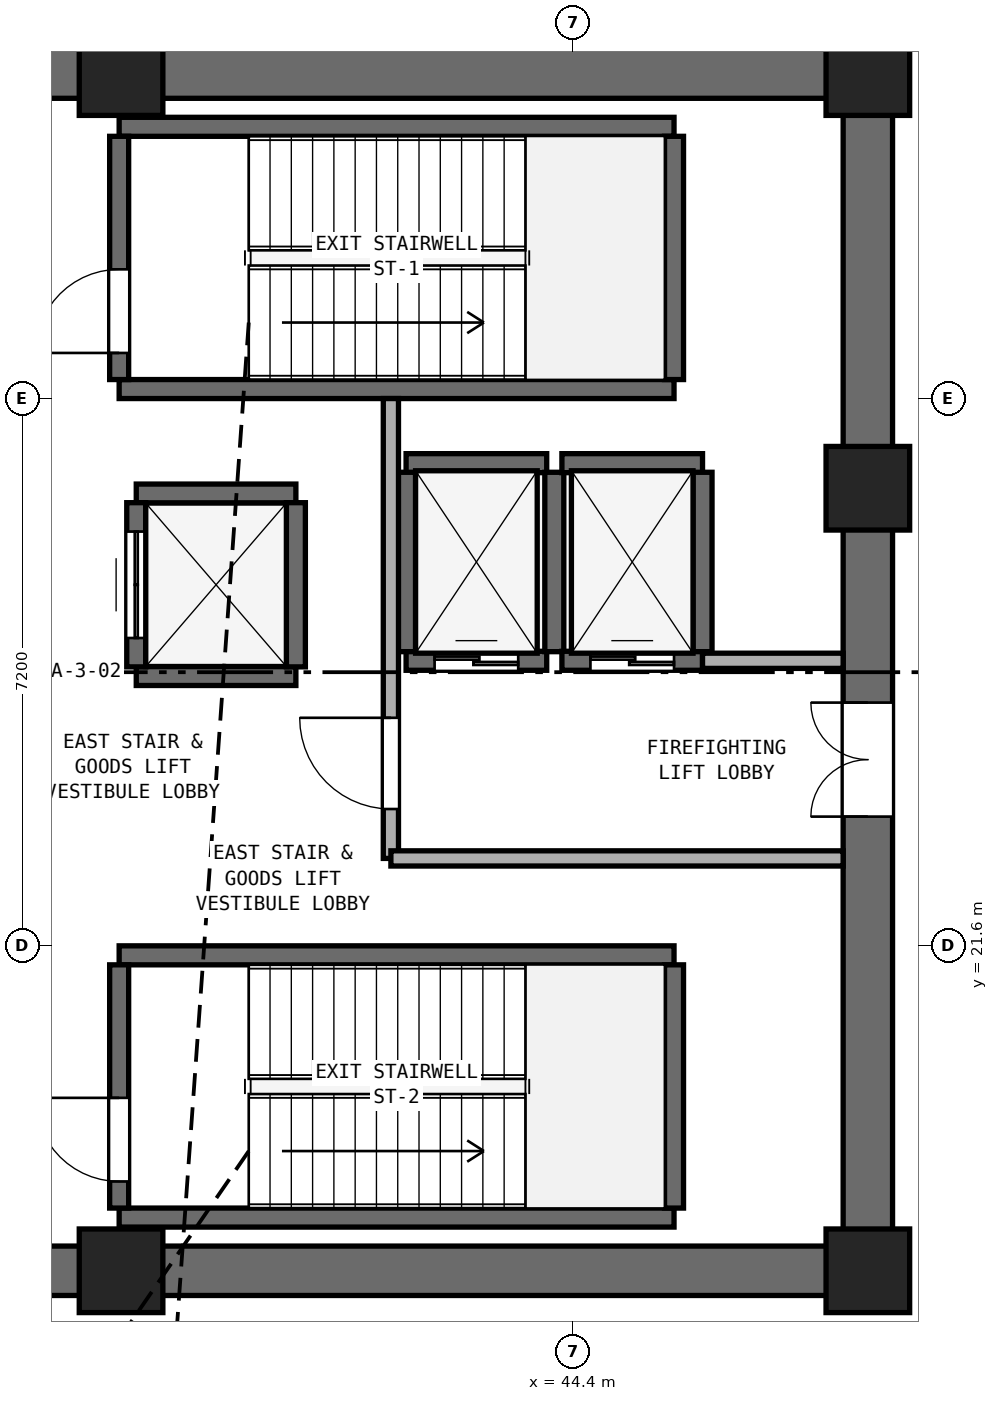
"""IFC4 building model, lengths in metres.
Left out: names, types, materials, properties, quantities, classifications, styles, units other than length and angle.
Written with IfcOpenShell. Run it as: python <this file> out.ifc"""

import sys

from ifc_helpers import new_model, si_unit, direction, frame, frame_2d, origin, origin_2d, place, context, subcontext, project, spatial, rectangle, extrude, element, fill, save


model = new_model("IFC4")
c1 = context("Model", 3, precision=1e-05, world=origin(), true_north=direction((0.0, 1.0)))
c2 = subcontext(c1, "Body", "Model", "MODEL_VIEW")
j1 = project(units=[si_unit("LENGTHUNIT", "METRE"), si_unit("PLANEANGLEUNIT", "RADIAN")], contexts=[c1])
p1 = place(None, origin())
s1 = spatial("IfcSite", under=j1, at=p1, CompositionType="ELEMENT")
p2 = place(p1, origin())
s2 = spatial("IfcBuilding", under=s1, at=p2, CompositionType="ELEMENT")
p3 = place(p2, origin())
s3 = spatial("IfcBuildingStorey", under=s2, at=p3, CompositionType="ELEMENT", Elevation=0.0)
for number, where, z_axis, x_axis in (
    (1, (25.4, 17.325, 0.0), (0.0, 0.0, 1.0), (1.0, 0.0, 0.0)),
    (2, (25.4, 33.075, 0.0), (0.0, 0.0, 1.0), (1.0, 0.0, 0.0)),
):
    element("IfcWall", number, at=place(p3, frame(where, z_axis=z_axis, x_axis=x_axis)), inside=s3, PredefinedType="SHEAR", context=c2, shape_type="SweptSolid", body=[
        extrude(rectangle(XDim=23.2, YDim=0.65, at=frame_2d((11.6, 0.0))), origin(), (0.0, 0.0, 1.0), 4.66),
    ])
p4 = place(p3, frame((48.275, 17.65, 0.0), z_axis=(0.0, 0.0, 1.0), x_axis=(0.0, 1.0, 0.0)))
e3 = element("IfcWall", 3, at=p4, inside=s3, PredefinedType="SHEAR", context=c2, shape_type="SweptSolid", body=[
    extrude(rectangle(XDim=15.1, YDim=0.65, at=frame_2d((7.55, 0.0))), origin(), (0.0, 0.0, 1.0), 4.66),
])
p5 = place(p4, frame((5.65, 0.0, 0.0)))
e4 = element("IfcOpeningElement", 4, at=p5, cuts=e3, PredefinedType="OPENING", context=c2, shape_type="SweptSolid", body=[
    extrude(rectangle(XDim=1.5, YDim=2.15, at=frame_2d((0.75, 1.075))), frame((0.0, 0.335, 0.0), z_axis=(0.0, -1.0, 0.0), x_axis=(1.0, 0.0, 0.0)), (0.0, 0.0, 1.0), 0.67),
])
for number, where, z_axis, x_axis in (
    (5, (38.45, 17.325, 0.0), (0.0, 0.0, 1.0), (1.0, 0.0, 0.0)),
    (6, (48.275, 17.325, 0.0), (0.0, 0.0, 1.0), (1.0, 0.0, 0.0)),
    (7, (48.275, 27.62, 0.0), (0.0, 0.0, 1.0), (1.0, 0.0, 0.0)),
    (8, (48.275, 33.075, 0.0), (0.0, 0.0, 1.0), (1.0, 0.0, 0.0)),
    (9, (38.45, 33.075, 0.0), (0.0, 0.0, 1.0), (1.0, 0.0, 0.0)),
):
    element("IfcColumn", number, at=place(p3, frame(where, z_axis=z_axis, x_axis=x_axis)), inside=s3, PredefinedType="PILASTER", context=c2, shape_type="SweptSolid", body=[
        extrude(rectangle(XDim=1.1, YDim=1.1, at=origin_2d()), origin(), (0.0, 0.0, 1.0), 5.0),
    ])
for number, where, z_axis, x_axis in (
    (10, (38.425, 28.925, 0.0), (0.0, 0.0, 1.0), (1.0, 0.0, 0.0)),
    (11, (38.425, 32.375, 0.0), (0.0, 0.0, 1.0), (1.0, 0.0, 0.0)),
):
    element("IfcWall", number, at=place(p3, frame(where, z_axis=z_axis, x_axis=x_axis)), inside=s3, PredefinedType="SHEAR", context=c2, shape_type="SweptSolid", body=[
        extrude(rectangle(XDim=7.3, YDim=0.25, at=frame_2d((3.65, 0.0))), origin(), (0.0, 0.0, 1.0), 4.66),
    ])
p6 = place(p3, frame((38.425, 29.05, 0.0), z_axis=(0.0, 0.0, 1.0), x_axis=(0.0, 1.0, 0.0)))
e12 = element("IfcWall", 12, at=p6, inside=s3, PredefinedType="SHEAR", context=c2, shape_type="SweptSolid", body=[
    extrude(rectangle(XDim=3.2, YDim=0.25, at=frame_2d((1.6, 0.0))), origin(), (0.0, 0.0, 1.0), 4.66),
])
p7 = place(p6, frame((0.35, 0.0, 0.0)))
e13 = element("IfcOpeningElement", 13, at=p7, cuts=e12, PredefinedType="OPENING", context=c2, shape_type="SweptSolid", body=[
    extrude(rectangle(XDim=1.1, YDim=2.15, at=frame_2d((0.55, 1.075))), frame((0.0, 0.135, 0.0), z_axis=(0.0, -1.0, 0.0), x_axis=(1.0, 0.0, 0.0)), (0.0, 0.0, 1.0), 0.27),
])
p8 = place(p3, frame((45.725, 29.05, 0.0), z_axis=(0.0, 0.0, 1.0), x_axis=(0.0, 1.0, 0.0)))
e14 = element("IfcWall", 14, at=p8, inside=s3, PredefinedType="SHEAR", context=c2, shape_type="SweptSolid", body=[
    extrude(rectangle(XDim=3.2, YDim=0.25, at=frame_2d((1.6, 0.0))), origin(), (0.0, 0.0, 1.0), 4.66),
])
for number, where, z_axis, x_axis in (
    (15, (38.425, 18.025, 0.0), (0.0, 0.0, 1.0), (1.0, 0.0, 0.0)),
    (16, (38.425, 21.475, 0.0), (0.0, 0.0, 1.0), (1.0, 0.0, 0.0)),
):
    element("IfcWall", number, at=place(p3, frame(where, z_axis=z_axis, x_axis=x_axis)), inside=s3, PredefinedType="SHEAR", context=c2, shape_type="SweptSolid", body=[
        extrude(rectangle(XDim=7.3, YDim=0.25, at=frame_2d((3.65, 0.0))), origin(), (0.0, 0.0, 1.0), 4.66),
    ])
p9 = place(p3, frame((38.425, 18.15, 0.0), z_axis=(0.0, 0.0, 1.0), x_axis=(0.0, 1.0, 0.0)))
e17 = element("IfcWall", 17, at=p9, inside=s3, PredefinedType="SHEAR", context=c2, shape_type="SweptSolid", body=[
    extrude(rectangle(XDim=3.2, YDim=0.25, at=frame_2d((1.6, 0.0))), origin(), (0.0, 0.0, 1.0), 4.66),
])
p10 = place(p9, frame((0.35, 0.0, 0.0)))
e18 = element("IfcOpeningElement", 18, at=p10, cuts=e17, PredefinedType="OPENING", context=c2, shape_type="SweptSolid", body=[
    extrude(rectangle(XDim=1.1, YDim=2.15, at=frame_2d((0.55, 1.075))), frame((0.0, 0.135, 0.0), z_axis=(0.0, -1.0, 0.0), x_axis=(1.0, 0.0, 0.0)), (0.0, 0.0, 1.0), 0.27),
])
p11 = place(p3, frame((45.725, 18.15, 0.0), z_axis=(0.0, 0.0, 1.0), x_axis=(0.0, 1.0, 0.0)))
e19 = element("IfcWall", 19, at=p11, inside=s3, PredefinedType="SHEAR", context=c2, shape_type="SweptSolid", body=[
    extrude(rectangle(XDim=3.2, YDim=0.25, at=frame_2d((1.6, 0.0))), origin(), (0.0, 0.0, 1.0), 4.66),
])
p12 = place(p3, frame((42.2, 25.35, 0.0), z_axis=(0.0, 0.0, 1.0), x_axis=(1.0, 0.0, 0.0)))
e20 = element("IfcWall", 20, at=p12, inside=s3, PredefinedType="SHEAR", context=c2, shape_type="SweptSolid", body=[
    extrude(rectangle(XDim=1.85, YDim=0.25, at=frame_2d((0.925, 0.0))), origin(), (0.0, 0.0, 1.0), 4.66),
])
p13 = place(p12, frame((0.375, 0.0, 0.0)))
e21 = element("IfcOpeningElement", 21, at=p13, cuts=e20, PredefinedType="OPENING", context=c2, shape_type="SweptSolid", body=[
    extrude(rectangle(XDim=1.1, YDim=2.15, at=frame_2d((0.55, 1.075))), frame((0.0, 0.135, 0.0), z_axis=(0.0, -1.0, 0.0), x_axis=(1.0, 0.0, 0.0)), (0.0, 0.0, 1.0), 0.27),
])
p14 = place(p3, frame((42.2, 27.95, 0.0), z_axis=(0.0, 0.0, 1.0), x_axis=(1.0, 0.0, 0.0)))
e22 = element("IfcWall", 22, at=p14, inside=s3, PredefinedType="SHEAR", context=c2, shape_type="SweptSolid", body=[
    extrude(rectangle(XDim=1.85, YDim=0.25, at=frame_2d((0.925, 0.0))), origin(), (0.0, 0.0, 1.0), 4.66),
])
for number, where, z_axis, x_axis in (
    (23, (42.2, 25.47, 0.0), (0.0, 0.0, 1.0), (0.0, 1.0, 0.0)),
    (24, (44.15, 25.47, 0.0), (0.0, 0.0, 1.0), (0.0, 1.0, 0.0)),
):
    element("IfcWall", number, at=place(p3, frame(where, z_axis=z_axis, x_axis=x_axis)), inside=s3, PredefinedType="SHEAR", context=c2, shape_type="SweptSolid", body=[
        extrude(rectangle(XDim=2.36, YDim=0.25, at=frame_2d((1.18, 0.0))), origin(), (0.0, 0.0, 1.0), 4.66),
    ])
p15 = place(p3, frame((44.25, 25.35, 0.0), z_axis=(0.0, 0.0, 1.0), x_axis=(1.0, 0.0, 0.0)))
e25 = element("IfcWall", 25, at=p15, inside=s3, PredefinedType="SHEAR", context=c2, shape_type="SweptSolid", body=[
    extrude(rectangle(XDim=1.85, YDim=0.25, at=frame_2d((0.925, 0.0))), origin(), (0.0, 0.0, 1.0), 4.66),
])
p16 = place(p15, frame((0.375, 0.0, 0.0)))
e26 = element("IfcOpeningElement", 26, at=p16, cuts=e25, PredefinedType="OPENING", context=c2, shape_type="SweptSolid", body=[
    extrude(rectangle(XDim=1.1, YDim=2.15, at=frame_2d((0.55, 1.075))), frame((0.0, 0.135, 0.0), z_axis=(0.0, -1.0, 0.0), x_axis=(1.0, 0.0, 0.0)), (0.0, 0.0, 1.0), 0.27),
])
p17 = place(p3, frame((44.25, 27.95, 0.0), z_axis=(0.0, 0.0, 1.0), x_axis=(1.0, 0.0, 0.0)))
e27 = element("IfcWall", 27, at=p17, inside=s3, PredefinedType="SHEAR", context=c2, shape_type="SweptSolid", body=[
    extrude(rectangle(XDim=1.85, YDim=0.25, at=frame_2d((0.925, 0.0))), origin(), (0.0, 0.0, 1.0), 4.66),
])
p18 = place(p3, frame((46.1, 25.47, 0.0), z_axis=(0.0, 0.0, 1.0), x_axis=(0.0, 1.0, 0.0)))
e28 = element("IfcWall", 28, at=p18, inside=s3, PredefinedType="SHEAR", context=c2, shape_type="SweptSolid", body=[
    extrude(rectangle(XDim=2.36, YDim=0.25, at=frame_2d((1.18, 0.0))), origin(), (0.0, 0.0, 1.0), 4.66),
])
for number, where, z_axis, x_axis in (
    (29, (38.65, 25.15, 0.0), (0.0, 0.0, 1.0), (1.0, 0.0, 0.0)),
    (30, (38.65, 27.55, 0.0), (0.0, 0.0, 1.0), (1.0, 0.0, 0.0)),
):
    element("IfcWall", number, at=place(p3, frame(where, z_axis=z_axis, x_axis=x_axis)), inside=s3, PredefinedType="SHEAR", context=c2, shape_type="SweptSolid", body=[
        extrude(rectangle(XDim=2.1, YDim=0.25, at=frame_2d((1.05, 0.0))), origin(), (0.0, 0.0, 1.0), 4.66),
    ])
p19 = place(p3, frame((38.65, 25.27, 0.0), z_axis=(0.0, 0.0, 1.0), x_axis=(0.0, 1.0, 0.0)))
e31 = element("IfcWall", 31, at=p19, inside=s3, PredefinedType="SHEAR", context=c2, shape_type="SweptSolid", body=[
    extrude(rectangle(XDim=2.16, YDim=0.25, at=frame_2d((1.08, 0.0))), origin(), (0.0, 0.0, 1.0), 4.66),
])
p20 = place(p19, frame((0.38, 0.0, 0.0)))
e32 = element("IfcOpeningElement", 32, at=p20, cuts=e31, PredefinedType="OPENING", context=c2, shape_type="SweptSolid", body=[
    extrude(rectangle(XDim=1.4, YDim=2.2, at=frame_2d((0.7, 1.1))), frame((0.0, 0.135, 0.0), z_axis=(0.0, -1.0, 0.0), x_axis=(1.0, 0.0, 0.0)), (0.0, 0.0, 1.0), 0.27),
])
p21 = place(p3, frame((40.75, 25.27, 0.0), z_axis=(0.0, 0.0, 1.0), x_axis=(0.0, 1.0, 0.0)))
e33 = element("IfcWall", 33, at=p21, inside=s3, PredefinedType="SHEAR", context=c2, shape_type="SweptSolid", body=[
    extrude(rectangle(XDim=2.16, YDim=0.25, at=frame_2d((1.08, 0.0))), origin(), (0.0, 0.0, 1.0), 4.66),
])
p22 = place(p3, frame((42.0, 22.75, 0.0), z_axis=(0.0, 0.0, 1.0), x_axis=(0.0, 1.0, 0.0)))
e34 = element("IfcWall", 34, at=p22, inside=s3, PredefinedType="SOLIDWALL", context=c2, shape_type="SweptSolid", body=[
    extrude(rectangle(XDim=6.05, YDim=0.2, at=frame_2d((3.025, 0.0))), origin(), (0.0, 0.0, 1.0), 4.66),
])
p23 = place(p22, frame((0.65, 0.0, 0.0)))
e35 = element("IfcOpeningElement", 35, at=p23, cuts=e34, PredefinedType="OPENING", context=c2, shape_type="SweptSolid", body=[
    extrude(rectangle(XDim=1.2, YDim=2.15, at=frame_2d((0.6, 1.075))), frame((0.0, 0.11, 0.0), z_axis=(0.0, -1.0, 0.0), x_axis=(1.0, 0.0, 0.0)), (0.0, 0.0, 1.0), 0.22),
])
p24 = place(p3, frame((42.0, 22.75, 0.0), z_axis=(0.0, 0.0, 1.0), x_axis=(1.0, 0.0, 0.0)))
e36 = element("IfcWall", 36, at=p24, inside=s3, PredefinedType="SOLIDWALL", context=c2, shape_type="SweptSolid", body=[
    extrude(rectangle(XDim=5.95, YDim=0.2, at=frame_2d((2.975, 0.0))), origin(), (0.0, 0.0, 1.0), 4.66),
])
p25 = place(p3, frame((46.1, 25.35, 0.0), z_axis=(0.0, 0.0, 1.0), x_axis=(1.0, 0.0, 0.0)))
e37 = element("IfcWall", 37, at=p25, inside=s3, PredefinedType="SOLIDWALL", context=c2, shape_type="SweptSolid", body=[
    extrude(rectangle(XDim=1.85, YDim=0.2, at=frame_2d((0.925, 0.0))), origin(), (0.0, 0.0, 1.0), 4.66),
])
p26 = place(p7, origin())
e38 = element("IfcDoor", 38, at=p26, inside=s3, OperationType="SINGLE_SWING_LEFT", PredefinedType="DOOR", context=c2, shape_type="SweptSolid", body=[
    extrude(rectangle(XDim=1.1, YDim=2.15, at=frame_2d((0.55, 1.075))), frame((0.0, 0.025, 0.0), z_axis=(0.0, -1.0, 0.0), x_axis=(1.0, 0.0, 0.0)), (0.0, 0.0, 1.0), 0.05),
])
fill(e13, e38)
p27 = place(p10, origin())
e39 = element("IfcDoor", 39, at=p27, inside=s3, OperationType="SINGLE_SWING_RIGHT", PredefinedType="DOOR", context=c2, shape_type="SweptSolid", body=[
    extrude(rectangle(XDim=1.1, YDim=2.15, at=frame_2d((0.55, 1.075))), frame((0.0, 0.025, 0.0), z_axis=(0.0, -1.0, 0.0), x_axis=(1.0, 0.0, 0.0)), (0.0, 0.0, 1.0), 0.05),
])
fill(e18, e39)
p28 = place(p13, origin())
e40 = element("IfcDoor", 40, at=p28, inside=s3, OperationType="DOUBLE_DOOR_SLIDING", PredefinedType="DOOR", context=c2, shape_type="SweptSolid", body=[
    extrude(rectangle(XDim=1.1, YDim=2.15, at=frame_2d((0.55, 1.075))), frame((0.0, 0.025, 0.0), z_axis=(0.0, -1.0, 0.0), x_axis=(1.0, 0.0, 0.0)), (0.0, 0.0, 1.0), 0.05),
])
fill(e21, e40)
p29 = place(p16, origin())
e41 = element("IfcDoor", 41, at=p29, inside=s3, OperationType="DOUBLE_DOOR_SLIDING", PredefinedType="DOOR", context=c2, shape_type="SweptSolid", body=[
    extrude(rectangle(XDim=1.1, YDim=2.15, at=frame_2d((0.55, 1.075))), frame((0.0, 0.025, 0.0), z_axis=(0.0, -1.0, 0.0), x_axis=(1.0, 0.0, 0.0)), (0.0, 0.0, 1.0), 0.05),
])
fill(e26, e41)
p30 = place(p20, origin())
e42 = element("IfcDoor", 42, at=p30, inside=s3, OperationType="DOUBLE_DOOR_SLIDING", PredefinedType="DOOR", context=c2, shape_type="SweptSolid", body=[
    extrude(rectangle(XDim=1.4, YDim=2.2, at=frame_2d((0.7, 1.1))), frame((0.0, 0.025, 0.0), z_axis=(0.0, -1.0, 0.0), x_axis=(1.0, 0.0, 0.0)), (0.0, 0.0, 1.0), 0.05),
])
fill(e32, e42)
p31 = place(p23, origin())
e43 = element("IfcDoor", 43, at=p31, inside=s3, OperationType="SINGLE_SWING_RIGHT", PredefinedType="DOOR", context=c2, shape_type="SweptSolid", body=[
    extrude(rectangle(XDim=1.2, YDim=2.15, at=frame_2d((0.6, 1.075))), frame((0.0, 0.025, 0.0), z_axis=(0.0, -1.0, 0.0), x_axis=(1.0, 0.0, 0.0)), (0.0, 0.0, 1.0), 0.05),
])
fill(e35, e43)
p32 = place(p5, origin())
e44 = element("IfcDoor", 44, at=p32, inside=s3, OperationType="DOUBLE_DOOR_SINGLE_SWING", PredefinedType="DOOR", context=c2, shape_type="SweptSolid", body=[
    extrude(rectangle(XDim=1.5, YDim=2.15, at=frame_2d((0.75, 1.075))), frame((0.0, 0.025, 0.0), z_axis=(0.0, -1.0, 0.0), x_axis=(1.0, 0.0, 0.0)), (0.0, 0.0, 1.0), 0.05),
])
fill(e4, e44)
save(model, sys.argv[1])
